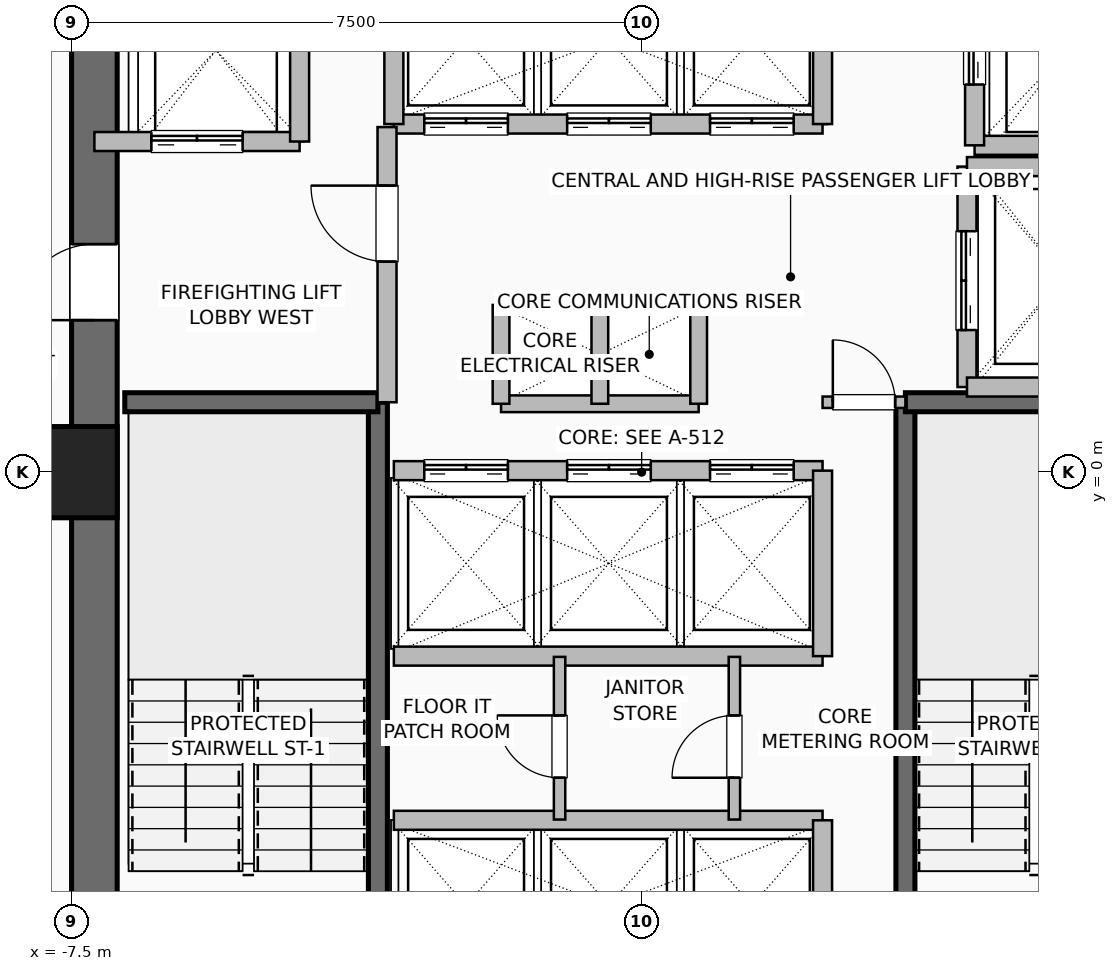
"""IFC4 building model, lengths in metres.
Left out: names, types, materials, properties, quantities, classifications, styles, units other than length and angle.
Written with IfcOpenShell. Run it as: python <this file> out.ifc"""

import sys

from ifc_helpers import new_model, si_unit, direction, frame, frame_2d, origin, origin_2d, place, context, subcontext, project, spatial, rectangle, hollow_rectangle, extrude, element, fill, save


model = new_model("IFC4")
c1 = context("Model", 3, precision=1e-05, world=origin(), true_north=direction((0.0, 1.0)))
c2 = subcontext(c1, "Body", "Model", "MODEL_VIEW")
j1 = project(units=[si_unit("LENGTHUNIT", "METRE"), si_unit("PLANEANGLEUNIT", "RADIAN")], contexts=[c1])
p1 = place(None, origin())
s1 = spatial("IfcSite", under=j1, at=p1, CompositionType="ELEMENT")
p2 = place(p1, origin())
s2 = spatial("IfcBuilding", under=s1, at=p2, CompositionType="ELEMENT")
p3 = place(p2, frame((0.0, 0.0, 44.5)))
s3 = spatial("IfcBuildingStorey", under=s2, at=p3, CompositionType="ELEMENT", Elevation=44.5)
p4 = place(p3, frame((-7.5, 0.0, 0.0), z_axis=(0.0, 0.0, 1.0), x_axis=(1.0, 0.0, 0.0)))
e1 = element("IfcColumn", 1, at=p4, inside=s3, PredefinedType="COLUMN", context=c2, shape_type="SweptSolid", body=[
    extrude(hollow_rectangle(XDim=1.2, YDim=1.2, WallThickness=0.055, at=origin_2d()), origin(), (0.0, 0.0, 1.0), 3.5),
])
p5 = place(p3, frame((-7.2, -7.5, 0.0), z_axis=(0.0, 0.0, 1.0), x_axis=(0.0, 1.0, 0.0)))
e2 = element("IfcWall", 2, at=p5, inside=s3, PredefinedType="SHEAR", context=c2, shape_type="SweptSolid", body=[
    extrude(rectangle(XDim=15.0, YDim=0.6, at=frame_2d((7.5, 0.0))), origin(), (0.0, 0.0, 1.0), 3.25),
])
p6 = place(p5, frame((9.5, 0.0, 0.0)))
e3 = element("IfcOpeningElement", 3, at=p6, cuts=e2, PredefinedType="OPENING", context=c2, shape_type="SweptSolid", body=[
    extrude(rectangle(XDim=1.0, YDim=2.08, at=frame_2d((0.5, 1.04))), frame((0.0, 0.31, 0.0), z_axis=(0.0, -1.0, 0.0), x_axis=(1.0, 0.0, 0.0)), (0.0, 0.0, 1.0), 0.62),
])
p7 = place(p3, frame((-3.47, -6.8, 0.0), z_axis=(0.0, 0.0, 1.0), x_axis=(0.0, 1.0, 0.0)))
e4 = element("IfcWall", 4, at=p7, inside=s3, PredefinedType="SHEAR", context=c2, shape_type="SweptSolid", body=[
    extrude(rectangle(XDim=7.72, YDim=0.25, at=frame_2d((3.86, 0.0))), origin(), (0.0, 0.0, 1.0), 3.25),
])
p8 = place(p3, frame((-6.8, 0.92, 0.0), z_axis=(0.0, 0.0, 1.0), x_axis=(1.0, 0.0, 0.0)))
e5 = element("IfcWall", 5, at=p8, inside=s3, PredefinedType="SHEAR", context=c2, shape_type="SweptSolid", body=[
    extrude(rectangle(XDim=3.33, YDim=0.25, at=frame_2d((1.665, 0.0))), origin(), (0.0, 0.0, 1.0), 3.25),
])
p9 = place(p3, frame((3.47, -6.8, 0.0), z_axis=(0.0, 0.0, 1.0), x_axis=(0.0, 1.0, 0.0)))
e6 = element("IfcWall", 6, at=p9, inside=s3, PredefinedType="SHEAR", context=c2, shape_type="SweptSolid", body=[
    extrude(rectangle(XDim=7.72, YDim=0.25, at=frame_2d((3.86, 0.0))), origin(), (0.0, 0.0, 1.0), 3.25),
])
p10 = place(p3, frame((3.47, 0.92, 0.0), z_axis=(0.0, 0.0, 1.0), x_axis=(1.0, 0.0, 0.0)))
e7 = element("IfcWall", 7, at=p10, inside=s3, PredefinedType="SHEAR", context=c2, shape_type="SweptSolid", body=[
    extrude(rectangle(XDim=3.33, YDim=0.25, at=frame_2d((1.665, 0.0))), origin(), (0.0, 0.0, 1.0), 3.25),
])
for number, where, z_axis, x_axis in (
    (8, (-1.85, 2.2, 0.0), (0.0, 0.0, 1.0), (1.0, 0.0, 0.0)),
    (9, (-1.85, 0.9, 0.0), (0.0, 0.0, 1.0), (1.0, 0.0, 0.0)),
):
    element("IfcWall", number, at=place(p3, frame(where, z_axis=z_axis, x_axis=x_axis)), inside=s3, PredefinedType="PARTITIONING", context=c2, shape_type="SweptSolid", body=[
        extrude(rectangle(XDim=2.6, YDim=0.22, at=frame_2d((1.3, 0.0))), origin(), (0.0, 0.0, 1.0), 3.25),
    ])
for number, where, z_axis, x_axis in (
    (10, (-0.55, 0.9, 0.0), (0.0, 0.0, 1.0), (0.0, 1.0, 0.0)),
    (11, (0.75, 0.9, 0.0), (0.0, 0.0, 1.0), (0.0, 1.0, 0.0)),
    (12, (-1.85, 0.9, 0.0), (0.0, 0.0, 1.0), (0.0, 1.0, 0.0)),
):
    element("IfcWall", number, at=place(p3, frame(where, z_axis=z_axis, x_axis=x_axis)), inside=s3, PredefinedType="PARTITIONING", context=c2, shape_type="SweptSolid", body=[
        extrude(rectangle(XDim=1.3, YDim=0.22, at=frame_2d((0.65, 0.0))), origin(), (0.0, 0.0, 1.0), 3.25),
    ])
p11 = place(p3, frame((-3.26, -4.58, 0.0), z_axis=(0.0, 0.0, 1.0), x_axis=(1.0, 0.0, 0.0)))
e13 = element("IfcWall", 13, at=p11, inside=s3, PredefinedType="SHEAR", context=c2, shape_type="SweptSolid", body=[
    extrude(rectangle(XDim=5.64, YDim=0.25, at=frame_2d((2.82, 0.0))), origin(), (0.0, 0.0, 1.0), 3.25),
])
p12 = place(p3, frame((2.38, -6.8, 0.0), z_axis=(0.0, 0.0, 1.0), x_axis=(0.0, 1.0, 0.0)))
e14 = element("IfcWall", 14, at=p12, inside=s3, PredefinedType="SHEAR", context=c2, shape_type="SweptSolid", body=[
    extrude(rectangle(XDim=2.22, YDim=0.25, at=frame_2d((1.11, 0.0))), origin(), (0.0, 0.0, 1.0), 3.25),
])
p13 = place(p3, frame((-3.26, 0.02, 0.0), z_axis=(0.0, 0.0, 1.0), x_axis=(1.0, 0.0, 0.0)))
e15 = element("IfcWall", 15, at=p13, inside=s3, PredefinedType="SHEAR", context=c2, shape_type="SweptSolid", body=[
    extrude(rectangle(XDim=5.64, YDim=0.25, at=frame_2d((2.82, 0.0))), origin(), (0.0, 0.0, 1.0), 3.25),
])
p14 = place(p13, frame((0.4, 0.0, 0.0)))
e16 = element("IfcOpeningElement", 16, at=p14, cuts=e15, PredefinedType="OPENING", context=c2, shape_type="SweptSolid", body=[
    extrude(rectangle(XDim=1.1, YDim=2.2, at=frame_2d((0.55, 1.1))), frame((0.0, 0.135, 0.0), z_axis=(0.0, -1.0, 0.0), x_axis=(1.0, 0.0, 0.0)), (0.0, 0.0, 1.0), 0.27),
])
p15 = place(p13, frame((2.28, 0.0, 0.0)))
e17 = element("IfcOpeningElement", 17, at=p15, cuts=e15, PredefinedType="OPENING", context=c2, shape_type="SweptSolid", body=[
    extrude(rectangle(XDim=1.1, YDim=2.2, at=frame_2d((0.55, 1.1))), frame((0.0, 0.135, 0.0), z_axis=(0.0, -1.0, 0.0), x_axis=(1.0, 0.0, 0.0)), (0.0, 0.0, 1.0), 0.27),
])
p16 = place(p13, frame((4.16, 0.0, 0.0)))
e18 = element("IfcOpeningElement", 18, at=p16, cuts=e15, PredefinedType="OPENING", context=c2, shape_type="SweptSolid", body=[
    extrude(rectangle(XDim=1.1, YDim=2.2, at=frame_2d((0.55, 1.1))), frame((0.0, 0.135, 0.0), z_axis=(0.0, -1.0, 0.0), x_axis=(1.0, 0.0, 0.0)), (0.0, 0.0, 1.0), 0.27),
])
p17 = place(p3, frame((-3.26, -2.42, 0.0), z_axis=(0.0, 0.0, 1.0), x_axis=(1.0, 0.0, 0.0)))
e19 = element("IfcWall", 19, at=p17, inside=s3, PredefinedType="SHEAR", context=c2, shape_type="SweptSolid", body=[
    extrude(rectangle(XDim=5.64, YDim=0.25, at=frame_2d((2.82, 0.0))), origin(), (0.0, 0.0, 1.0), 3.25),
])
p18 = place(p3, frame((2.38, -2.42, 0.0), z_axis=(0.0, 0.0, 1.0), x_axis=(0.0, 1.0, 0.0)))
e20 = element("IfcWall", 20, at=p18, inside=s3, PredefinedType="SHEAR", context=c2, shape_type="SweptSolid", body=[
    extrude(rectangle(XDim=2.44, YDim=0.25, at=frame_2d((1.22, 0.0))), origin(), (0.0, 0.0, 1.0), 3.25),
])
p19 = place(p3, frame((-3.26, 4.58, 0.0), z_axis=(0.0, 0.0, 1.0), x_axis=(1.0, 0.0, 0.0)))
e21 = element("IfcWall", 21, at=p19, inside=s3, PredefinedType="SHEAR", context=c2, shape_type="SweptSolid", body=[
    extrude(rectangle(XDim=5.64, YDim=0.25, at=frame_2d((2.82, 0.0))), origin(), (0.0, 0.0, 1.0), 3.25),
])
p20 = place(p19, frame((0.4, 0.0, 0.0)))
e22 = element("IfcOpeningElement", 22, at=p20, cuts=e21, PredefinedType="OPENING", context=c2, shape_type="SweptSolid", body=[
    extrude(rectangle(XDim=1.1, YDim=2.2, at=frame_2d((0.55, 1.1))), frame((0.0, 0.135, 0.0), z_axis=(0.0, -1.0, 0.0), x_axis=(1.0, 0.0, 0.0)), (0.0, 0.0, 1.0), 0.27),
])
p21 = place(p19, frame((2.28, 0.0, 0.0)))
e23 = element("IfcOpeningElement", 23, at=p21, cuts=e21, PredefinedType="OPENING", context=c2, shape_type="SweptSolid", body=[
    extrude(rectangle(XDim=1.1, YDim=2.2, at=frame_2d((0.55, 1.1))), frame((0.0, 0.135, 0.0), z_axis=(0.0, -1.0, 0.0), x_axis=(1.0, 0.0, 0.0)), (0.0, 0.0, 1.0), 0.27),
])
p22 = place(p19, frame((4.16, 0.0, 0.0)))
e24 = element("IfcOpeningElement", 24, at=p22, cuts=e21, PredefinedType="OPENING", context=c2, shape_type="SweptSolid", body=[
    extrude(rectangle(XDim=1.1, YDim=2.2, at=frame_2d((0.55, 1.1))), frame((0.0, 0.135, 0.0), z_axis=(0.0, -1.0, 0.0), x_axis=(1.0, 0.0, 0.0)), (0.0, 0.0, 1.0), 0.27),
])
for number, where, z_axis, x_axis in (
    (25, (-3.26, 4.58, 0.0), (0.0, 0.0, 1.0), (0.0, 1.0, 0.0)),
    (26, (2.38, 4.58, 0.0), (0.0, 0.0, 1.0), (0.0, 1.0, 0.0)),
):
    element("IfcWall", number, at=place(p3, frame(where, z_axis=z_axis, x_axis=x_axis)), inside=s3, PredefinedType="SHEAR", context=c2, shape_type="SweptSolid", body=[
        extrude(rectangle(XDim=2.22, YDim=0.25, at=frame_2d((1.11, 0.0))), origin(), (0.0, 0.0, 1.0), 3.25),
    ])
p23 = place(p3, frame((-7.2, 4.35, 0.0), z_axis=(0.0, 0.0, 1.0), x_axis=(1.0, 0.0, 0.0)))
e27 = element("IfcWall", 27, at=p23, inside=s3, PredefinedType="SHEAR", context=c2, shape_type="SweptSolid", body=[
    extrude(rectangle(XDim=2.7, YDim=0.25, at=frame_2d((1.35, 0.0))), origin(), (0.0, 0.0, 1.0), 3.25),
])
p24 = place(p23, frame((0.75, 0.0, 0.0)))
e28 = element("IfcOpeningElement", 28, at=p24, cuts=e27, PredefinedType="OPENING", context=c2, shape_type="SweptSolid", body=[
    extrude(rectangle(XDim=1.2, YDim=2.2, at=frame_2d((0.6, 1.1))), frame((0.0, 0.135, 0.0), z_axis=(0.0, -1.0, 0.0), x_axis=(1.0, 0.0, 0.0)), (0.0, 0.0, 1.0), 0.27),
])
p25 = place(p3, frame((-4.5, 4.35, 0.0), z_axis=(0.0, 0.0, 1.0), x_axis=(0.0, 1.0, 0.0)))
e29 = element("IfcWall", 29, at=p25, inside=s3, PredefinedType="SHEAR", context=c2, shape_type="SweptSolid", body=[
    extrude(rectangle(XDim=2.85, YDim=0.25, at=frame_2d((1.425, 0.0))), origin(), (0.0, 0.0, 1.0), 3.25),
])
p26 = place(p3, frame((4.38, 4.3, 0.0), z_axis=(0.0, 0.0, 1.0), x_axis=(1.0, 0.0, 0.0)))
e30 = element("IfcWall", 30, at=p26, inside=s3, PredefinedType="SHEAR", context=c2, shape_type="SweptSolid", body=[
    extrude(rectangle(XDim=2.42, YDim=0.25, at=frame_2d((1.21, 0.0))), origin(), (0.0, 0.0, 1.0), 3.25),
])
p27 = place(p3, frame((4.38, 4.3, 0.0), z_axis=(0.0, 0.0, 1.0), x_axis=(0.0, 1.0, 0.0)))
e31 = element("IfcWall", 31, at=p27, inside=s3, PredefinedType="SHEAR", context=c2, shape_type="SweptSolid", body=[
    extrude(rectangle(XDim=2.5, YDim=0.25, at=frame_2d((1.25, 0.0))), origin(), (0.0, 0.0, 1.0), 3.25),
])
p28 = place(p27, frame((0.8, 0.0, 0.0)))
e32 = element("IfcOpeningElement", 32, at=p28, cuts=e31, PredefinedType="OPENING", context=c2, shape_type="SweptSolid", body=[
    extrude(rectangle(XDim=1.2, YDim=2.2, at=frame_2d((0.6, 1.1))), frame((0.0, 0.135, 0.0), z_axis=(0.0, -1.0, 0.0), x_axis=(1.0, 0.0, 0.0)), (0.0, 0.0, 1.0), 0.27),
])
p29 = place(p3, frame((4.28, 1.12, 0.0), z_axis=(0.0, 0.0, 1.0), x_axis=(0.0, 1.0, 0.0)))
e33 = element("IfcWall", 33, at=p29, inside=s3, PredefinedType="SHEAR", context=c2, shape_type="SweptSolid", body=[
    extrude(rectangle(XDim=2.9, YDim=0.25, at=frame_2d((1.45, 0.0))), origin(), (0.0, 0.0, 1.0), 3.25),
])
p30 = place(p29, frame((0.75, 0.0, 0.0)))
e34 = element("IfcOpeningElement", 34, at=p30, cuts=e33, PredefinedType="OPENING", context=c2, shape_type="SweptSolid", body=[
    extrude(rectangle(XDim=1.3, YDim=2.3, at=frame_2d((0.65, 1.15))), frame((0.0, 0.135, 0.0), z_axis=(0.0, -1.0, 0.0), x_axis=(1.0, 0.0, 0.0)), (0.0, 0.0, 1.0), 0.27),
])
for number, where, z_axis, x_axis in (
    (35, (4.28, 1.12, 0.0), (0.0, 0.0, 1.0), (1.0, 0.0, 0.0)),
    (36, (4.28, 4.02, 0.0), (0.0, 0.0, 1.0), (1.0, 0.0, 0.0)),
):
    element("IfcWall", number, at=place(p3, frame(where, z_axis=z_axis, x_axis=x_axis)), inside=s3, PredefinedType="SHEAR", context=c2, shape_type="SweptSolid", body=[
        extrude(rectangle(XDim=2.52, YDim=0.25, at=frame_2d((1.26, 0.0))), origin(), (0.0, 0.0, 1.0), 3.25),
    ])
p31 = place(p3, frame((-3.35, 0.92, 0.0), z_axis=(0.0, 0.0, 1.0), x_axis=(0.0, 1.0, 0.0)))
e37 = element("IfcWall", 37, at=p31, inside=s3, PredefinedType="SHEAR", context=c2, shape_type="SweptSolid", body=[
    extrude(rectangle(XDim=3.62, YDim=0.25, at=frame_2d((1.81, 0.0))), origin(), (0.0, 0.0, 1.0), 3.25),
])
p32 = place(p31, frame((1.85, 0.0, 0.0)))
e38 = element("IfcOpeningElement", 38, at=p32, cuts=e37, PredefinedType="OPENING", context=c2, shape_type="SweptSolid", body=[
    extrude(rectangle(XDim=1.0, YDim=2.08, at=frame_2d((0.5, 1.04))), frame((0.0, 0.135, 0.0), z_axis=(0.0, -1.0, 0.0), x_axis=(1.0, 0.0, 0.0)), (0.0, 0.0, 1.0), 0.27),
])
p33 = place(p3, frame((2.38, 0.92, 0.0), z_axis=(0.0, 0.0, 1.0), x_axis=(1.0, 0.0, 0.0)))
e39 = element("IfcWall", 39, at=p33, inside=s3, PredefinedType="PARTITIONING", context=c2, shape_type="SweptSolid", body=[
    extrude(rectangle(XDim=1.09, YDim=0.15, at=frame_2d((0.545, 0.0))), origin(), (0.0, 0.0, 1.0), 3.25),
])
p34 = place(p33, frame((0.135, 0.0, 0.0)))
e40 = element("IfcOpeningElement", 40, at=p34, cuts=e39, PredefinedType="OPENING", context=c2, shape_type="SweptSolid", body=[
    extrude(rectangle(XDim=0.82, YDim=2.05, at=frame_2d((0.41, 1.025))), frame((0.0, 0.085, 0.0), z_axis=(0.0, -1.0, 0.0), x_axis=(1.0, 0.0, 0.0)), (0.0, 0.0, 1.0), 0.17),
])
p35 = place(p3, frame((-1.08, -4.57, 0.0), z_axis=(0.0, 0.0, 1.0), x_axis=(0.0, 1.0, 0.0)))
e41 = element("IfcWall", 41, at=p35, inside=s3, PredefinedType="PARTITIONING", context=c2, shape_type="SweptSolid", body=[
    extrude(rectangle(XDim=2.14, YDim=0.15, at=frame_2d((1.07, 0.0))), origin(), (0.0, 0.0, 1.0), 3.25),
])
p36 = place(p35, frame((0.55, 0.0, 0.0)))
e42 = element("IfcOpeningElement", 42, at=p36, cuts=e41, PredefinedType="OPENING", context=c2, shape_type="SweptSolid", body=[
    extrude(rectangle(XDim=0.82, YDim=2.05, at=frame_2d((0.41, 1.025))), frame((0.0, 0.085, 0.0), z_axis=(0.0, -1.0, 0.0), x_axis=(1.0, 0.0, 0.0)), (0.0, 0.0, 1.0), 0.17),
])
p37 = place(p3, frame((1.22, -4.57, 0.0), z_axis=(0.0, 0.0, 1.0), x_axis=(0.0, 1.0, 0.0)))
e43 = element("IfcWall", 43, at=p37, inside=s3, PredefinedType="PARTITIONING", context=c2, shape_type="SweptSolid", body=[
    extrude(rectangle(XDim=2.14, YDim=0.15, at=frame_2d((1.07, 0.0))), origin(), (0.0, 0.0, 1.0), 3.25),
])
p38 = place(p37, frame((0.55, 0.0, 0.0)))
e44 = element("IfcOpeningElement", 44, at=p38, cuts=e43, PredefinedType="OPENING", context=c2, shape_type="SweptSolid", body=[
    extrude(rectangle(XDim=0.82, YDim=2.05, at=frame_2d((0.41, 1.025))), frame((0.0, 0.085, 0.0), z_axis=(0.0, -1.0, 0.0), x_axis=(1.0, 0.0, 0.0)), (0.0, 0.0, 1.0), 0.17),
])
p39 = place(p6, origin())
e45 = element("IfcDoor", 45, at=p39, inside=s3, OperationType="SINGLE_SWING_LEFT", PredefinedType="DOOR", context=c2, shape_type="SweptSolid", body=[
    extrude(rectangle(XDim=1.0, YDim=2.08, at=frame_2d((0.5, 1.04))), frame((0.0, 0.025, 0.0), z_axis=(0.0, -1.0, 0.0), x_axis=(1.0, 0.0, 0.0)), (0.0, 0.0, 1.0), 0.05),
])
fill(e3, e45)
p40 = place(p14, origin())
e46 = element("IfcDoor", 46, at=p40, inside=s3, OperationType="DOUBLE_DOOR_SLIDING", PredefinedType="DOOR", context=c2, shape_type="SweptSolid", body=[
    extrude(rectangle(XDim=1.1, YDim=2.2, at=frame_2d((0.55, 1.1))), frame((0.0, 0.025, 0.0), z_axis=(0.0, -1.0, 0.0), x_axis=(1.0, 0.0, 0.0)), (0.0, 0.0, 1.0), 0.05),
])
fill(e16, e46)
p41 = place(p15, origin())
e47 = element("IfcDoor", 47, at=p41, inside=s3, OperationType="DOUBLE_DOOR_SLIDING", PredefinedType="DOOR", context=c2, shape_type="SweptSolid", body=[
    extrude(rectangle(XDim=1.1, YDim=2.2, at=frame_2d((0.55, 1.1))), frame((0.0, 0.025, 0.0), z_axis=(0.0, -1.0, 0.0), x_axis=(1.0, 0.0, 0.0)), (0.0, 0.0, 1.0), 0.05),
])
fill(e17, e47)
p42 = place(p16, origin())
e48 = element("IfcDoor", 48, at=p42, inside=s3, OperationType="DOUBLE_DOOR_SLIDING", PredefinedType="DOOR", context=c2, shape_type="SweptSolid", body=[
    extrude(rectangle(XDim=1.1, YDim=2.2, at=frame_2d((0.55, 1.1))), frame((0.0, 0.025, 0.0), z_axis=(0.0, -1.0, 0.0), x_axis=(1.0, 0.0, 0.0)), (0.0, 0.0, 1.0), 0.05),
])
fill(e18, e48)
p43 = place(p20, origin())
e49 = element("IfcDoor", 49, at=p43, inside=s3, OperationType="DOUBLE_DOOR_SLIDING", PredefinedType="DOOR", context=c2, shape_type="SweptSolid", body=[
    extrude(rectangle(XDim=1.1, YDim=2.2, at=frame_2d((0.55, 1.1))), frame((0.0, 0.025, 0.0), z_axis=(0.0, -1.0, 0.0), x_axis=(1.0, 0.0, 0.0)), (0.0, 0.0, 1.0), 0.05),
])
fill(e22, e49)
p44 = place(p21, origin())
e50 = element("IfcDoor", 50, at=p44, inside=s3, OperationType="DOUBLE_DOOR_SLIDING", PredefinedType="DOOR", context=c2, shape_type="SweptSolid", body=[
    extrude(rectangle(XDim=1.1, YDim=2.2, at=frame_2d((0.55, 1.1))), frame((0.0, 0.025, 0.0), z_axis=(0.0, -1.0, 0.0), x_axis=(1.0, 0.0, 0.0)), (0.0, 0.0, 1.0), 0.05),
])
fill(e23, e50)
p45 = place(p22, origin())
e51 = element("IfcDoor", 51, at=p45, inside=s3, OperationType="DOUBLE_DOOR_SLIDING", PredefinedType="DOOR", context=c2, shape_type="SweptSolid", body=[
    extrude(rectangle(XDim=1.1, YDim=2.2, at=frame_2d((0.55, 1.1))), frame((0.0, 0.025, 0.0), z_axis=(0.0, -1.0, 0.0), x_axis=(1.0, 0.0, 0.0)), (0.0, 0.0, 1.0), 0.05),
])
fill(e24, e51)
p46 = place(p24, origin())
e52 = element("IfcDoor", 52, at=p46, inside=s3, OperationType="DOUBLE_DOOR_SLIDING", PredefinedType="DOOR", context=c2, shape_type="SweptSolid", body=[
    extrude(rectangle(XDim=1.2, YDim=2.2, at=frame_2d((0.6, 1.1))), frame((0.0, 0.025, 0.0), z_axis=(0.0, -1.0, 0.0), x_axis=(1.0, 0.0, 0.0)), (0.0, 0.0, 1.0), 0.05),
])
fill(e28, e52)
p47 = place(p28, origin())
e53 = element("IfcDoor", 53, at=p47, inside=s3, OperationType="DOUBLE_DOOR_SLIDING", PredefinedType="DOOR", context=c2, shape_type="SweptSolid", body=[
    extrude(rectangle(XDim=1.2, YDim=2.2, at=frame_2d((0.6, 1.1))), frame((0.0, 0.025, 0.0), z_axis=(0.0, -1.0, 0.0), x_axis=(1.0, 0.0, 0.0)), (0.0, 0.0, 1.0), 0.05),
])
fill(e32, e53)
p48 = place(p30, origin())
e54 = element("IfcDoor", 54, at=p48, inside=s3, OperationType="DOUBLE_DOOR_SLIDING", PredefinedType="DOOR", context=c2, shape_type="SweptSolid", body=[
    extrude(rectangle(XDim=1.3, YDim=2.3, at=frame_2d((0.65, 1.15))), frame((0.0, 0.025, 0.0), z_axis=(0.0, -1.0, 0.0), x_axis=(1.0, 0.0, 0.0)), (0.0, 0.0, 1.0), 0.05),
])
fill(e34, e54)
p49 = place(p32, origin())
e55 = element("IfcDoor", 55, at=p49, inside=s3, OperationType="SINGLE_SWING_RIGHT", PredefinedType="DOOR", context=c2, shape_type="SweptSolid", body=[
    extrude(rectangle(XDim=1.0, YDim=2.08, at=frame_2d((0.5, 1.04))), frame((0.0, 0.025, 0.0), z_axis=(0.0, -1.0, 0.0), x_axis=(1.0, 0.0, 0.0)), (0.0, 0.0, 1.0), 0.05),
])
fill(e38, e55)
p50 = place(p34, origin())
e56 = element("IfcDoor", 56, at=p50, inside=s3, OperationType="SINGLE_SWING_LEFT", PredefinedType="DOOR", context=c2, shape_type="SweptSolid", body=[
    extrude(rectangle(XDim=0.82, YDim=2.05, at=frame_2d((0.41, 1.025))), frame((0.0, 0.025, 0.0), z_axis=(0.0, -1.0, 0.0), x_axis=(1.0, 0.0, 0.0)), (0.0, 0.0, 1.0), 0.05),
])
fill(e40, e56)
p51 = place(p36, origin())
e57 = element("IfcDoor", 57, at=p51, inside=s3, OperationType="SINGLE_SWING_RIGHT", PredefinedType="DOOR", context=c2, shape_type="SweptSolid", body=[
    extrude(rectangle(XDim=0.82, YDim=2.05, at=frame_2d((0.41, 1.025))), frame((0.0, 0.025, 0.0), z_axis=(0.0, -1.0, 0.0), x_axis=(1.0, 0.0, 0.0)), (0.0, 0.0, 1.0), 0.05),
])
fill(e42, e57)
p52 = place(p38, origin())
e58 = element("IfcDoor", 58, at=p52, inside=s3, OperationType="SINGLE_SWING_LEFT", PredefinedType="DOOR", context=c2, shape_type="SweptSolid", body=[
    extrude(rectangle(XDim=0.82, YDim=2.05, at=frame_2d((0.41, 1.025))), frame((0.0, 0.025, 0.0), z_axis=(0.0, -1.0, 0.0), x_axis=(1.0, 0.0, 0.0)), (0.0, 0.0, 1.0), 0.05),
])
fill(e44, e58)
save(model, sys.argv[1])
